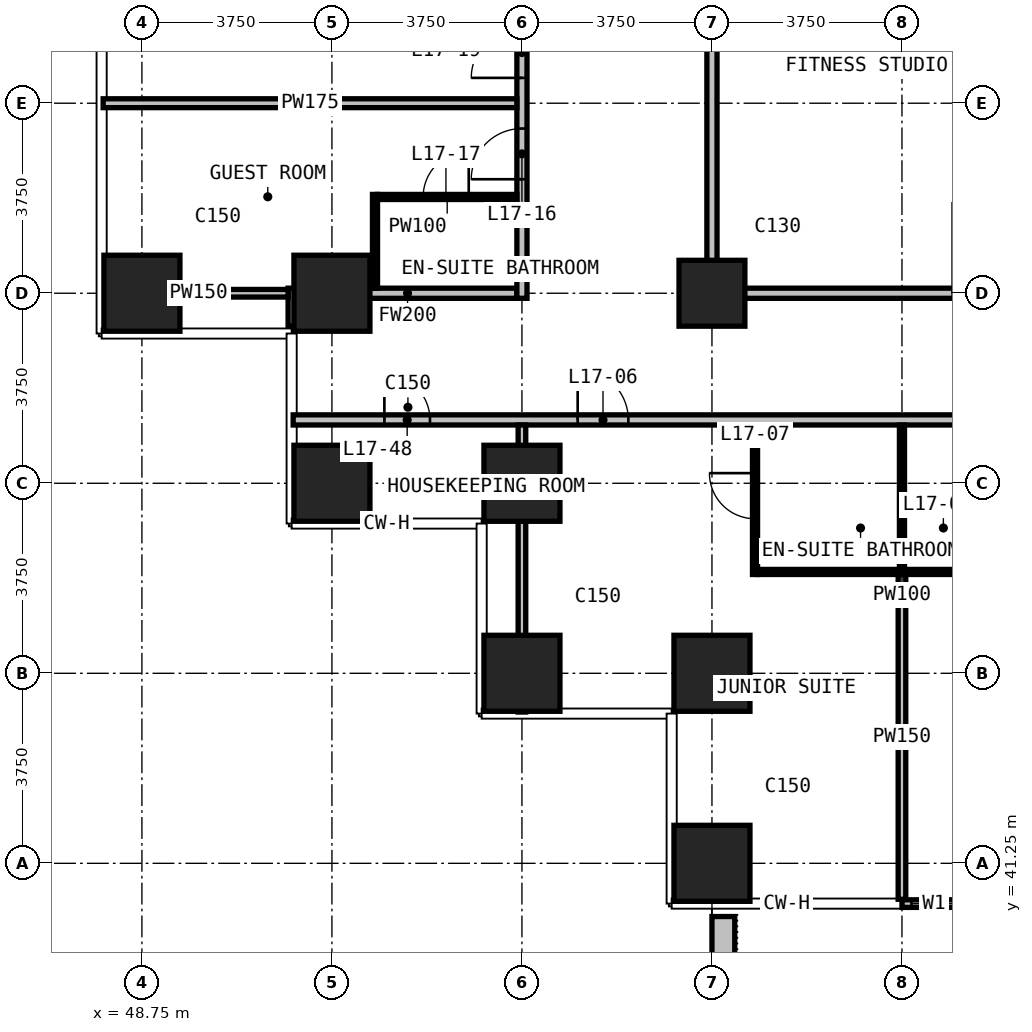
"""IFC4 building model, lengths in metres.
Left out: names, types, materials, properties, quantities, classifications, styles, units other than length and angle.
Written with IfcOpenShell. Run it as: python <this file> out.ifc"""

import sys

from ifc_helpers import new_model, si_unit, direction, frame, frame_2d, origin, origin_2d, place, context, subcontext, project, spatial, rectangle, extrude, element, fill, save


model = new_model("IFC4")
c1 = context("Model", 3, precision=1e-05, world=origin(), true_north=direction((0.0, 1.0)))
c2 = subcontext(c1, "Body", "Model", "MODEL_VIEW")
j1 = project(units=[si_unit("LENGTHUNIT", "METRE"), si_unit("PLANEANGLEUNIT", "RADIAN")], contexts=[c1])
p1 = place(None, origin())
s1 = spatial("IfcSite", under=j1, at=p1, CompositionType="ELEMENT")
p2 = place(p1, origin())
s2 = spatial("IfcBuilding", under=s1, at=p2, CompositionType="ELEMENT")
p3 = place(p2, frame((0.0, 0.0, 75.8)))
s3 = spatial("IfcBuildingStorey", under=s2, at=p3, CompositionType="ELEMENT", Elevation=75.8)
for number, where, z_axis, x_axis in (
    (1, (48.75, 52.5, 0.0), (0.0, 0.0, 1.0), (1.0, 0.0, 0.0)),
    (2, (52.5, 48.75, 0.0), (0.0, 0.0, 1.0), (1.0, 0.0, 0.0)),
    (3, (52.5, 52.5, 0.0), (0.0, 0.0, 1.0), (1.0, 0.0, 0.0)),
    (4, (56.25, 45.0, 0.0), (0.0, 0.0, 1.0), (1.0, 0.0, 0.0)),
    (5, (56.25, 48.75, 0.0), (0.0, 0.0, 1.0), (1.0, 0.0, 0.0)),
    (6, (60.0, 41.25, 0.0), (0.0, 0.0, 1.0), (1.0, 0.0, 0.0)),
    (7, (60.0, 45.0, 0.0), (0.0, 0.0, 1.0), (1.0, 0.0, 0.0)),
):
    element("IfcColumn", number, at=place(p3, frame(where, z_axis=z_axis, x_axis=x_axis)), inside=s3, PredefinedType="COLUMN", context=c2, shape_type="SweptSolid", body=[
        extrude(rectangle(XDim=1.5, YDim=1.5, at=origin_2d()), origin(), (0.0, 0.0, 1.0), 3.3),
    ])
p4 = place(p3, frame((60.0, 52.5, 0.0), z_axis=(0.0, 0.0, 1.0), x_axis=(1.0, 0.0, 0.0)))
e8 = element("IfcColumn", 8, at=p4, inside=s3, PredefinedType="COLUMN", context=c2, shape_type="SweptSolid", body=[
    extrude(rectangle(XDim=1.3, YDim=1.3, at=origin_2d()), origin(), (0.0, 0.0, 1.0), 3.3),
])
p5 = place(p3, frame((63.75, 40.455, 0.0), z_axis=(0.0, 0.0, 1.0), x_axis=(1.0, 0.0, 0.0)))
e9 = element("IfcWall", 9, at=p5, inside=s3, PredefinedType="SOLIDWALL", context=c2, shape_type="SweptSolid", body=[
    extrude(rectangle(XDim=3.75, YDim=0.15, at=frame_2d((1.875, 0.0))), origin(), (0.0, 0.0, 1.0), 3.0),
])
p6 = place(p5, frame((0.188, 0.0, 0.1)))
e10 = element("IfcOpeningElement", 10, at=p6, cuts=e9, PredefinedType="OPENING", context=c2, shape_type="SweptSolid", body=[
    extrude(rectangle(XDim=0.9, YDim=2.4, at=frame_2d((0.45, 1.2))), frame((0.0, 0.085, 0.0), z_axis=(0.0, -1.0, 0.0), x_axis=(1.0, 0.0, 0.0)), (0.0, 0.0, 1.0), 0.17),
])
p7 = place(p5, frame((1.275, 0.0, 0.0)))
e11 = element("IfcOpeningElement", 11, at=p7, cuts=e9, PredefinedType="OPENING", context=c2, shape_type="SweptSolid", body=[
    extrude(rectangle(XDim=1.2, YDim=2.4, at=frame_2d((0.6, 1.2))), frame((0.0, 0.085, 0.0), z_axis=(0.0, -1.0, 0.0), x_axis=(1.0, 0.0, 0.0)), (0.0, 0.0, 1.0), 0.17),
])
p8 = place(p3, frame((60.225, 40.2, 0.0), z_axis=(0.0, 0.0, 1.0), x_axis=(0.0, -1.0, 0.0)))
e12 = element("IfcWall", 12, at=p8, inside=s3, PredefinedType="USERDEFINED", context=c2, shape_type="SweptSolid", body=[
    extrude(rectangle(XDim=2.35, YDim=0.45, at=frame_2d((1.175, 0.0))), origin(), (0.0, 0.0, 1.0), 1.1),
])
p9 = place(p3, frame((51.735, 50.0, 0.0), z_axis=(0.0, 0.0, 1.0), x_axis=(1.0, 0.0, 0.0)))
e13 = element("IfcWall", 13, at=p9, inside=s3, PredefinedType="PARTITIONING", context=c2, shape_type="SweptSolid", body=[
    extrude(rectangle(XDim=46.53, YDim=0.2, at=frame_2d((23.265, 0.0))), origin(), (0.0, 0.0, 1.0), 3.0),
])
p10 = place(p9, frame((5.615, 0.0, 0.0)))
e14 = element("IfcOpeningElement", 14, at=p10, cuts=e13, PredefinedType="OPENING", context=c2, shape_type="SweptSolid", body=[
    extrude(rectangle(XDim=1.0, YDim=2.2, at=frame_2d((0.5, 1.1))), frame((0.0, 0.11, 0.0), z_axis=(0.0, -1.0, 0.0), x_axis=(1.0, 0.0, 0.0)), (0.0, 0.0, 1.0), 0.22),
])
p11 = place(p9, frame((17.415, 0.0, 0.0)))
e15 = element("IfcOpeningElement", 15, at=p11, cuts=e13, PredefinedType="OPENING", context=c2, shape_type="SweptSolid", body=[
    extrude(rectangle(XDim=1.0, YDim=2.2, at=frame_2d((0.5, 1.1))), frame((0.0, 0.11, 0.0), z_axis=(0.0, -1.0, 0.0), x_axis=(1.0, 0.0, 0.0)), (0.0, 0.0, 1.0), 0.22),
])
p12 = place(p9, frame((20.615, 0.0, 0.0)))
e16 = element("IfcOpeningElement", 16, at=p12, cuts=e13, PredefinedType="OPENING", context=c2, shape_type="SweptSolid", body=[
    extrude(rectangle(XDim=1.0, YDim=2.2, at=frame_2d((0.5, 1.1))), frame((0.0, 0.11, 0.0), z_axis=(0.0, -1.0, 0.0), x_axis=(1.0, 0.0, 0.0)), (0.0, 0.0, 1.0), 0.22),
])
p13 = place(p9, frame((32.415, 0.0, 0.0)))
e17 = element("IfcOpeningElement", 17, at=p13, cuts=e13, PredefinedType="OPENING", context=c2, shape_type="SweptSolid", body=[
    extrude(rectangle(XDim=1.0, YDim=2.2, at=frame_2d((0.5, 1.1))), frame((0.0, 0.11, 0.0), z_axis=(0.0, -1.0, 0.0), x_axis=(1.0, 0.0, 0.0)), (0.0, 0.0, 1.0), 0.22),
])
p14 = place(p9, frame((35.615, 0.0, 0.0)))
e18 = element("IfcOpeningElement", 18, at=p14, cuts=e13, PredefinedType="OPENING", context=c2, shape_type="SweptSolid", body=[
    extrude(rectangle(XDim=1.0, YDim=2.2, at=frame_2d((0.5, 1.1))), frame((0.0, 0.11, 0.0), z_axis=(0.0, -1.0, 0.0), x_axis=(1.0, 0.0, 0.0)), (0.0, 0.0, 1.0), 0.22),
])
p15 = place(p9, frame((1.8, 0.0, 0.0)))
e19 = element("IfcOpeningElement", 19, at=p15, cuts=e13, PredefinedType="OPENING", context=c2, shape_type="SweptSolid", body=[
    extrude(rectangle(XDim=0.9, YDim=2.2, at=frame_2d((0.45, 1.1))), frame((0.0, 0.11, 0.0), z_axis=(0.0, -1.0, 0.0), x_axis=(1.0, 0.0, 0.0)), (0.0, 0.0, 1.0), 0.22),
])
p16 = place(p9, frame((43.815, 0.0, 0.0)))
e20 = element("IfcOpeningElement", 20, at=p16, cuts=e13, PredefinedType="OPENING", context=c2, shape_type="SweptSolid", body=[
    extrude(rectangle(XDim=0.9, YDim=2.2, at=frame_2d((0.45, 1.1))), frame((0.0, 0.11, 0.0), z_axis=(0.0, -1.0, 0.0), x_axis=(1.0, 0.0, 0.0)), (0.0, 0.0, 1.0), 0.22),
])
p17 = place(p3, frame((51.835, 52.5, 0.0), z_axis=(0.0, 0.0, 1.0), x_axis=(1.0, 0.0, 0.0)))
e21 = element("IfcWall", 21, at=p17, inside=s3, PredefinedType="PARTITIONING", context=c2, shape_type="SweptSolid", body=[
    extrude(rectangle(XDim=4.315, YDim=0.2, at=frame_2d((2.157, 0.0))), origin(), (0.0, 0.0, 1.0), 3.0),
])
p18 = place(p3, frame((60.1, 52.5, 0.0), z_axis=(0.0, 0.0, 1.0), x_axis=(1.0, 0.0, 0.0)))
e22 = element("IfcWall", 22, at=p18, inside=s3, PredefinedType="PARTITIONING", context=c2, shape_type="SweptSolid", body=[
    extrude(rectangle(XDim=29.8, YDim=0.2, at=frame_2d((14.9, 0.0))), origin(), (0.0, 0.0, 1.0), 3.0),
])
p19 = place(p18, frame((4.65, 0.0, 0.0)))
e23 = element("IfcOpeningElement", 23, at=p19, cuts=e22, PredefinedType="OPENING", context=c2, shape_type="SweptSolid", body=[
    extrude(rectangle(XDim=1.8, YDim=2.2, at=frame_2d((0.9, 1.1))), frame((0.0, 0.11, 0.0), z_axis=(0.0, -1.0, 0.0), x_axis=(1.0, 0.0, 0.0)), (0.0, 0.0, 1.0), 0.22),
])
p20 = place(p18, frame((13.25, 0.0, 0.0)))
e24 = element("IfcOpeningElement", 24, at=p20, cuts=e22, PredefinedType="OPENING", context=c2, shape_type="SweptSolid", body=[
    extrude(rectangle(XDim=1.0, YDim=2.2, at=frame_2d((0.5, 1.1))), frame((0.0, 0.11, 0.0), z_axis=(0.0, -1.0, 0.0), x_axis=(1.0, 0.0, 0.0)), (0.0, 0.0, 1.0), 0.22),
])
p21 = place(p18, frame((20.75, 0.0, 0.0)))
e25 = element("IfcOpeningElement", 25, at=p21, cuts=e22, PredefinedType="OPENING", context=c2, shape_type="SweptSolid", body=[
    extrude(rectangle(XDim=1.0, YDim=2.2, at=frame_2d((0.5, 1.1))), frame((0.0, 0.11, 0.0), z_axis=(0.0, -1.0, 0.0), x_axis=(1.0, 0.0, 0.0)), (0.0, 0.0, 1.0), 0.22),
])
p22 = place(p3, frame((51.735, 51.855, 0.0), z_axis=(0.0, 0.0, 1.0), x_axis=(0.0, 1.0, 0.0)))
e26 = element("IfcWall", 26, at=p22, inside=s3, PredefinedType="PARTITIONING", context=c2, shape_type="SweptSolid", body=[
    extrude(rectangle(XDim=0.745, YDim=0.2, at=frame_2d((0.373, 0.0))), origin(), (0.0, 0.0, 1.0), 3.0),
])
p23 = place(p3, frame((56.25, 52.4, 0.0), z_axis=(0.0, 0.0, 1.0), x_axis=(0.0, 1.0, 0.0)))
e27 = element("IfcWall", 27, at=p23, inside=s3, PredefinedType="PARTITIONING", context=c2, shape_type="SweptSolid", body=[
    extrude(rectangle(XDim=33.925, YDim=0.2, at=frame_2d((16.962, 0.0))), origin(), (0.0, 0.0, 1.0), 3.0),
])
p24 = place(p23, frame((2.35, 0.0, 0.0)))
e28 = element("IfcOpeningElement", 28, at=p24, cuts=e27, PredefinedType="OPENING", context=c2, shape_type="SweptSolid", body=[
    extrude(rectangle(XDim=1.0, YDim=2.2, at=frame_2d((0.5, 1.1))), frame((0.0, 0.11, 0.0), z_axis=(0.0, -1.0, 0.0), x_axis=(1.0, 0.0, 0.0)), (0.0, 0.0, 1.0), 0.22),
])
p25 = place(p23, frame((4.35, 0.0, 0.0)))
e29 = element("IfcOpeningElement", 29, at=p25, cuts=e27, PredefinedType="OPENING", context=c2, shape_type="SweptSolid", body=[
    extrude(rectangle(XDim=1.0, YDim=2.2, at=frame_2d((0.5, 1.1))), frame((0.0, 0.11, 0.0), z_axis=(0.0, -1.0, 0.0), x_axis=(1.0, 0.0, 0.0)), (0.0, 0.0, 1.0), 0.22),
])
p26 = place(p23, frame((9.85, 0.0, 0.0)))
e30 = element("IfcOpeningElement", 30, at=p26, cuts=e27, PredefinedType="OPENING", context=c2, shape_type="SweptSolid", body=[
    extrude(rectangle(XDim=1.0, YDim=2.2, at=frame_2d((0.5, 1.1))), frame((0.0, 0.11, 0.0), z_axis=(0.0, -1.0, 0.0), x_axis=(1.0, 0.0, 0.0)), (0.0, 0.0, 1.0), 0.22),
])
p27 = place(p23, frame((11.85, 0.0, 0.0)))
e31 = element("IfcOpeningElement", 31, at=p27, cuts=e27, PredefinedType="OPENING", context=c2, shape_type="SweptSolid", body=[
    extrude(rectangle(XDim=1.0, YDim=2.2, at=frame_2d((0.5, 1.1))), frame((0.0, 0.11, 0.0), z_axis=(0.0, -1.0, 0.0), x_axis=(1.0, 0.0, 0.0)), (0.0, 0.0, 1.0), 0.22),
])
p28 = place(p23, frame((17.35, 0.0, 0.0)))
e32 = element("IfcOpeningElement", 32, at=p28, cuts=e27, PredefinedType="OPENING", context=c2, shape_type="SweptSolid", body=[
    extrude(rectangle(XDim=1.0, YDim=2.2, at=frame_2d((0.5, 1.1))), frame((0.0, 0.11, 0.0), z_axis=(0.0, -1.0, 0.0), x_axis=(1.0, 0.0, 0.0)), (0.0, 0.0, 1.0), 0.22),
])
p29 = place(p23, frame((19.35, 0.0, 0.0)))
e33 = element("IfcOpeningElement", 33, at=p29, cuts=e27, PredefinedType="OPENING", context=c2, shape_type="SweptSolid", body=[
    extrude(rectangle(XDim=1.0, YDim=2.2, at=frame_2d((0.5, 1.1))), frame((0.0, 0.11, 0.0), z_axis=(0.0, -1.0, 0.0), x_axis=(1.0, 0.0, 0.0)), (0.0, 0.0, 1.0), 0.22),
])
p30 = place(p23, frame((24.85, 0.0, 0.0)))
e34 = element("IfcOpeningElement", 34, at=p30, cuts=e27, PredefinedType="OPENING", context=c2, shape_type="SweptSolid", body=[
    extrude(rectangle(XDim=1.0, YDim=2.2, at=frame_2d((0.5, 1.1))), frame((0.0, 0.11, 0.0), z_axis=(0.0, -1.0, 0.0), x_axis=(1.0, 0.0, 0.0)), (0.0, 0.0, 1.0), 0.22),
])
p31 = place(p23, frame((26.85, 0.0, 0.0)))
e35 = element("IfcOpeningElement", 35, at=p31, cuts=e27, PredefinedType="OPENING", context=c2, shape_type="SweptSolid", body=[
    extrude(rectangle(XDim=1.0, YDim=2.2, at=frame_2d((0.5, 1.1))), frame((0.0, 0.11, 0.0), z_axis=(0.0, -1.0, 0.0), x_axis=(1.0, 0.0, 0.0)), (0.0, 0.0, 1.0), 0.22),
])
p32 = place(p23, frame((31.55, 0.0, 0.0)))
e36 = element("IfcOpeningElement", 36, at=p32, cuts=e27, PredefinedType="OPENING", context=c2, shape_type="SweptSolid", body=[
    extrude(rectangle(XDim=0.9, YDim=2.2, at=frame_2d((0.45, 1.1))), frame((0.0, 0.11, 0.0), z_axis=(0.0, -1.0, 0.0), x_axis=(1.0, 0.0, 0.0)), (0.0, 0.0, 1.0), 0.22),
])
p33 = place(p3, frame((60.0, 52.4, 0.0), z_axis=(0.0, 0.0, 1.0), x_axis=(0.0, 1.0, 0.0)))
e37 = element("IfcWall", 37, at=p33, inside=s3, PredefinedType="PARTITIONING", context=c2, shape_type="SweptSolid", body=[
    extrude(rectangle(XDim=18.84, YDim=0.2, at=frame_2d((9.42, 0.0))), origin(), (0.0, 0.0, 1.0), 3.0),
])
p34 = place(p33, frame((10.9, 0.0, 0.0)))
e38 = element("IfcOpeningElement", 38, at=p34, cuts=e37, PredefinedType="OPENING", context=c2, shape_type="SweptSolid", body=[
    extrude(rectangle(XDim=0.9, YDim=2.2, at=frame_2d((0.45, 1.1))), frame((0.0, 0.11, 0.0), z_axis=(0.0, -1.0, 0.0), x_axis=(1.0, 0.0, 0.0)), (0.0, 0.0, 1.0), 0.22),
])
p35 = place(p33, frame((16.5, 0.0, 0.0)))
e39 = element("IfcOpeningElement", 39, at=p35, cuts=e37, PredefinedType="OPENING", context=c2, shape_type="SweptSolid", body=[
    extrude(rectangle(XDim=0.9, YDim=2.2, at=frame_2d((0.45, 1.1))), frame((0.0, 0.11, 0.0), z_axis=(0.0, -1.0, 0.0), x_axis=(1.0, 0.0, 0.0)), (0.0, 0.0, 1.0), 0.22),
])
p36 = place(p3, frame((47.985, 56.25, 0.0), z_axis=(0.0, 0.0, 1.0), x_axis=(1.0, 0.0, 0.0)))
e40 = element("IfcWall", 40, at=p36, inside=s3, PredefinedType="PARTITIONING", context=c2, shape_type="SweptSolid", body=[
    extrude(rectangle(XDim=8.165, YDim=0.175, at=frame_2d((4.083, 0.0))), origin(), (0.0, 0.0, 1.0), 3.0),
])
p37 = place(p3, frame((48.105, 52.5, 0.0), z_axis=(0.0, 0.0, 1.0), x_axis=(1.0, 0.0, 0.0)))
e41 = element("IfcWall", 41, at=p37, inside=s3, PredefinedType="PARTITIONING", context=c2, shape_type="SweptSolid", body=[
    extrude(rectangle(XDim=3.53, YDim=0.15, at=frame_2d((1.765, 0.0))), origin(), (0.0, 0.0, 1.0), 3.0),
])
p38 = place(p3, frame((56.25, 44.235, 0.0), z_axis=(0.0, 0.0, 1.0), x_axis=(0.0, 1.0, 0.0)))
e42 = element("IfcWall", 42, at=p38, inside=s3, PredefinedType="PARTITIONING", context=c2, shape_type="SweptSolid", body=[
    extrude(rectangle(XDim=5.665, YDim=0.15, at=frame_2d((2.833, 0.0))), origin(), (0.0, 0.0, 1.0), 3.0),
])
p39 = place(p3, frame((63.75, 40.54, 0.0), z_axis=(0.0, 0.0, 1.0), x_axis=(0.0, 1.0, 0.0)))
e43 = element("IfcWall", 43, at=p39, inside=s3, PredefinedType="PARTITIONING", context=c2, shape_type="SweptSolid", body=[
    extrude(rectangle(XDim=6.41, YDim=0.15, at=frame_2d((3.205, 0.0))), origin(), (0.0, 0.0, 1.0), 3.0),
])
p40 = place(p3, frame((60.9, 47.0, 0.0), z_axis=(0.0, 0.0, 1.0), x_axis=(1.0, 0.0, 0.0)))
e44 = element("IfcWall", 44, at=p40, inside=s3, PredefinedType="PARTITIONING", context=c2, shape_type="SweptSolid", body=[
    extrude(rectangle(XDim=5.7, YDim=0.1, at=frame_2d((2.85, 0.0))), origin(), (0.0, 0.0, 1.0), 3.0),
])
p41 = place(p3, frame((53.4, 54.4, 0.0), z_axis=(0.0, 0.0, 1.0), x_axis=(1.0, 0.0, 0.0)))
e45 = element("IfcWall", 45, at=p41, inside=s3, PredefinedType="PARTITIONING", context=c2, shape_type="SweptSolid", body=[
    extrude(rectangle(XDim=2.75, YDim=0.1, at=frame_2d((1.375, 0.0))), origin(), (0.0, 0.0, 1.0), 3.0),
])
p42 = place(p41, frame((0.9, 0.0, 0.0)))
e46 = element("IfcOpeningElement", 46, at=p42, cuts=e45, PredefinedType="OPENING", context=c2, shape_type="SweptSolid", body=[
    extrude(rectangle(XDim=0.9, YDim=2.2, at=frame_2d((0.45, 1.1))), frame((0.0, 0.06, 0.0), z_axis=(0.0, -1.0, 0.0), x_axis=(1.0, 0.0, 0.0)), (0.0, 0.0, 1.0), 0.12),
])
p43 = place(p3, frame((53.35, 52.6, 0.0), z_axis=(0.0, 0.0, 1.0), x_axis=(0.0, 1.0, 0.0)))
e47 = element("IfcWall", 47, at=p43, inside=s3, PredefinedType="PARTITIONING", context=c2, shape_type="SweptSolid", body=[
    extrude(rectangle(XDim=1.85, YDim=0.1, at=frame_2d((0.925, 0.0))), origin(), (0.0, 0.0, 1.0), 3.0),
])
p44 = place(p3, frame((60.85, 46.95, 0.0), z_axis=(0.0, 0.0, 1.0), x_axis=(0.0, 1.0, 0.0)))
e48 = element("IfcWall", 48, at=p44, inside=s3, PredefinedType="PARTITIONING", context=c2, shape_type="SweptSolid", body=[
    extrude(rectangle(XDim=2.95, YDim=0.1, at=frame_2d((1.475, 0.0))), origin(), (0.0, 0.0, 1.0), 3.0),
])
p45 = place(p44, frame((1.1, 0.0, 0.0)))
e49 = element("IfcOpeningElement", 49, at=p45, cuts=e48, PredefinedType="OPENING", context=c2, shape_type="SweptSolid", body=[
    extrude(rectangle(XDim=0.9, YDim=2.2, at=frame_2d((0.45, 1.1))), frame((0.0, 0.06, 0.0), z_axis=(0.0, -1.0, 0.0), x_axis=(1.0, 0.0, 0.0)), (0.0, 0.0, 1.0), 0.12),
])
p46 = place(p3, frame((63.75, 47.05, 0.0), z_axis=(0.0, 0.0, 1.0), x_axis=(0.0, 1.0, 0.0)))
e50 = element("IfcWall", 50, at=p46, inside=s3, PredefinedType="PARTITIONING", context=c2, shape_type="SweptSolid", body=[
    extrude(rectangle(XDim=2.85, YDim=0.1, at=frame_2d((1.425, 0.0))), origin(), (0.0, 0.0, 1.0), 3.0),
])
p47 = place(p6, origin())
e51 = element("IfcWindow", 51, at=p47, inside=s3, PartitioningType="SINGLE_PANEL", PredefinedType="WINDOW", context=c2, shape_type="SweptSolid", body=[
    extrude(rectangle(XDim=0.9, YDim=2.4, at=frame_2d((0.45, 1.2))), frame((0.0, 0.03, 0.0), z_axis=(0.0, -1.0, 0.0), x_axis=(1.0, 0.0, 0.0)), (0.0, 0.0, 1.0), 0.06),
])
fill(e10, e51)
p48 = place(p10, origin())
e52 = element("IfcDoor", 52, at=p48, inside=s3, OperationType="SINGLE_SWING_LEFT", PredefinedType="DOOR", context=c2, shape_type="SweptSolid", body=[
    extrude(rectangle(XDim=1.0, YDim=2.2, at=frame_2d((0.5, 1.1))), frame((0.0, 0.025, 0.0), z_axis=(0.0, -1.0, 0.0), x_axis=(1.0, 0.0, 0.0)), (0.0, 0.0, 1.0), 0.05),
])
fill(e14, e52)
p49 = place(p45, origin())
e53 = element("IfcDoor", 53, at=p49, inside=s3, OperationType="SINGLE_SWING_RIGHT", PredefinedType="DOOR", context=c2, shape_type="SweptSolid", body=[
    extrude(rectangle(XDim=0.9, YDim=2.2, at=frame_2d((0.45, 1.1))), frame((0.0, 0.025, 0.0), z_axis=(0.0, -1.0, 0.0), x_axis=(1.0, 0.0, 0.0)), (0.0, 0.0, 1.0), 0.05),
])
fill(e49, e53)
p50 = place(p24, origin())
e54 = element("IfcDoor", 54, at=p50, inside=s3, OperationType="SINGLE_SWING_RIGHT", PredefinedType="DOOR", context=c2, shape_type="SweptSolid", body=[
    extrude(rectangle(XDim=1.0, YDim=2.2, at=frame_2d((0.5, 1.1))), frame((0.0, 0.025, 0.0), z_axis=(0.0, -1.0, 0.0), x_axis=(1.0, 0.0, 0.0)), (0.0, 0.0, 1.0), 0.05),
])
fill(e28, e54)
p51 = place(p42, origin())
e55 = element("IfcDoor", 55, at=p51, inside=s3, OperationType="SINGLE_SWING_RIGHT", PredefinedType="DOOR", context=c2, shape_type="SweptSolid", body=[
    extrude(rectangle(XDim=0.9, YDim=2.2, at=frame_2d((0.45, 1.1))), frame((0.0, 0.025, 0.0), z_axis=(0.0, -1.0, 0.0), x_axis=(1.0, 0.0, 0.0)), (0.0, 0.0, 1.0), 0.05),
])
fill(e46, e55)
p52 = place(p25, origin())
e56 = element("IfcDoor", 56, at=p52, inside=s3, OperationType="SINGLE_SWING_RIGHT", PredefinedType="DOOR", context=c2, shape_type="SweptSolid", body=[
    extrude(rectangle(XDim=1.0, YDim=2.2, at=frame_2d((0.5, 1.1))), frame((0.0, 0.025, 0.0), z_axis=(0.0, -1.0, 0.0), x_axis=(1.0, 0.0, 0.0)), (0.0, 0.0, 1.0), 0.05),
])
fill(e29, e56)
p53 = place(p15, origin())
e57 = element("IfcDoor", 57, at=p53, inside=s3, OperationType="SINGLE_SWING_LEFT", PredefinedType="DOOR", context=c2, shape_type="SweptSolid", body=[
    extrude(rectangle(XDim=0.9, YDim=2.2, at=frame_2d((0.45, 1.1))), frame((0.0, 0.025, 0.0), z_axis=(0.0, -1.0, 0.0), x_axis=(1.0, 0.0, 0.0)), (0.0, 0.0, 1.0), 0.05),
])
fill(e19, e57)
p54 = place(p19, origin())
e58 = element("IfcDoor", 58, at=p54, inside=s3, OperationType="DOUBLE_DOOR_SINGLE_SWING", PredefinedType="DOOR", context=c2, shape_type="SweptSolid", body=[
    extrude(rectangle(XDim=1.8, YDim=2.2, at=frame_2d((0.9, 1.1))), frame((0.0, 0.025, 0.0), z_axis=(0.0, -1.0, 0.0), x_axis=(1.0, 0.0, 0.0)), (0.0, 0.0, 1.0), 0.05),
])
fill(e23, e58)
save(model, sys.argv[1])
